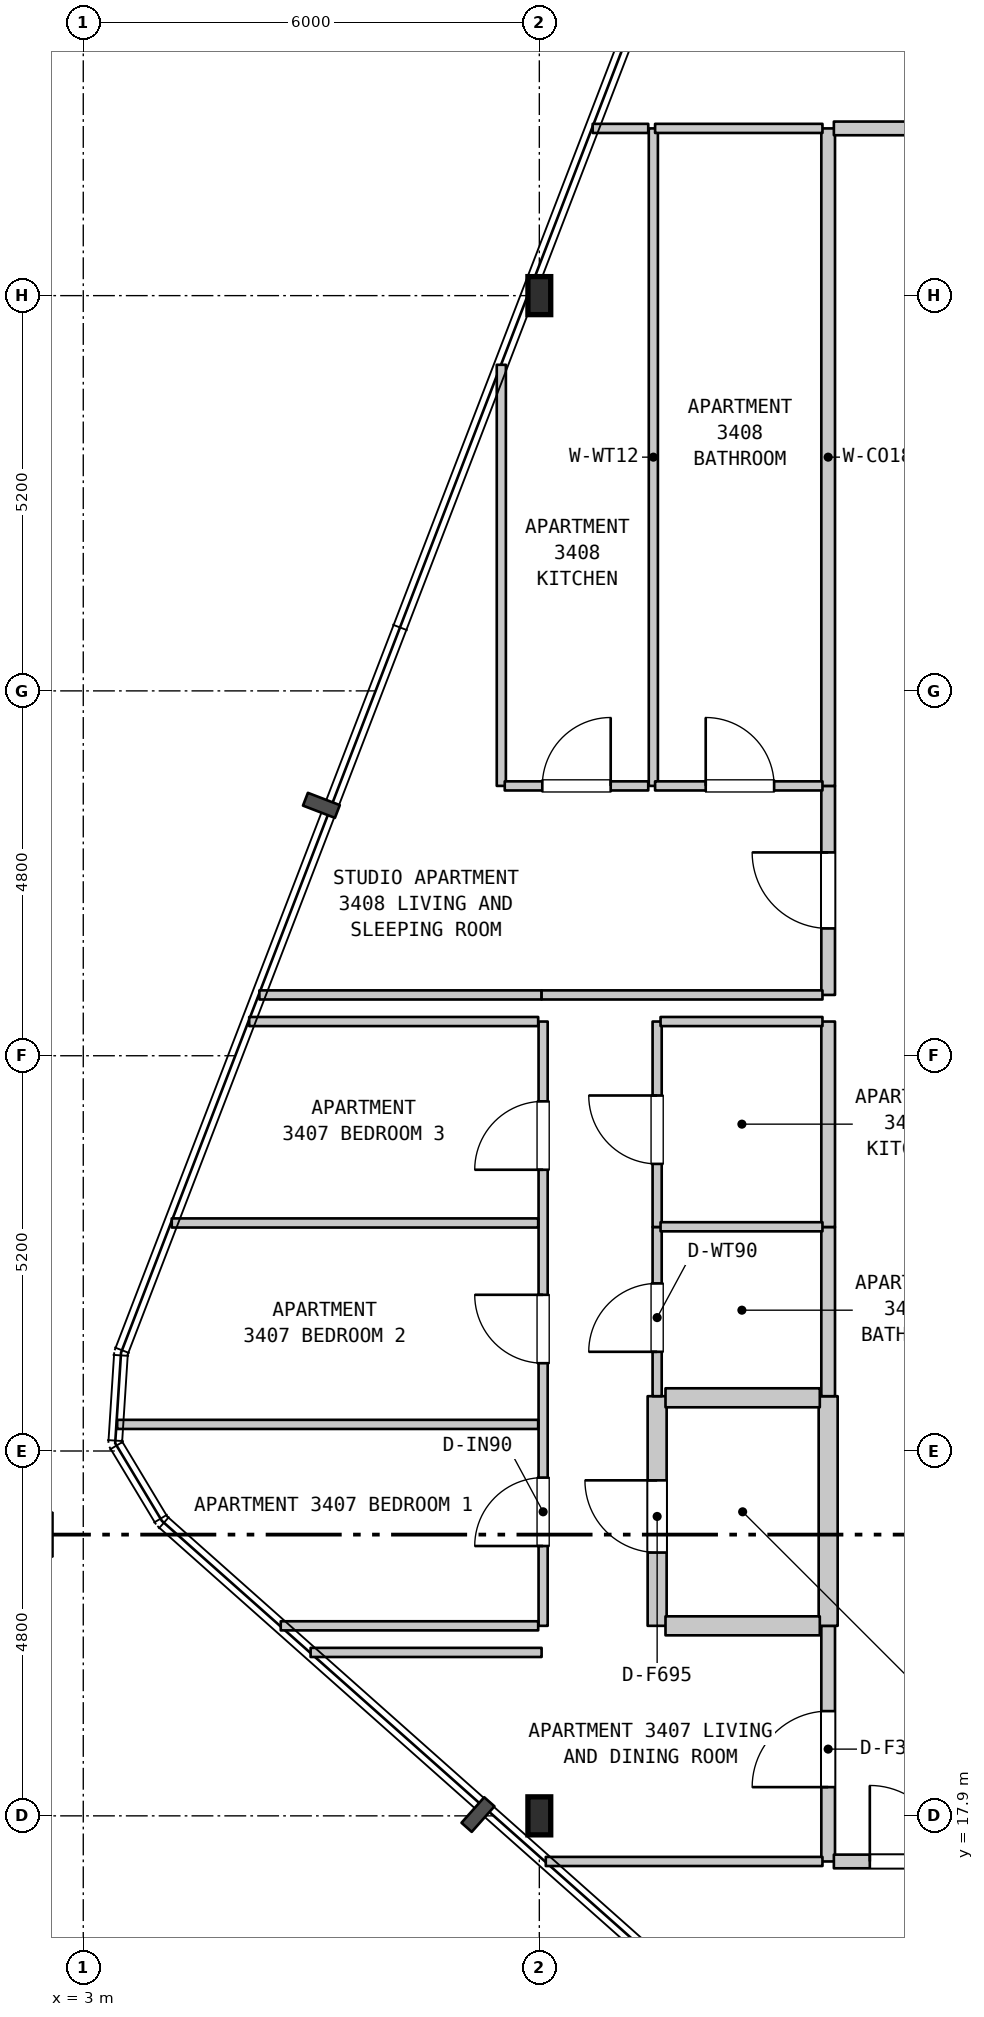
"""IFC4 building model, lengths in metres.
Left out: names, types, materials, properties, quantities, classifications, styles, units other than length and angle.
Written with IfcOpenShell. Run it as: python <this file> out.ifc"""

import sys

from ifc_helpers import new_model, si_unit, direction, frame, frame_2d, origin, origin_2d, place, context, subcontext, project, spatial, rectangle, i_section, extrude, element, fill, save


model = new_model("IFC4")
c1 = context("Model", 3, precision=1e-05, world=origin(), true_north=direction((0.0, 1.0)))
c2 = subcontext(c1, "Body", "Model", "MODEL_VIEW")
j1 = project(units=[si_unit("LENGTHUNIT", "METRE"), si_unit("PLANEANGLEUNIT", "RADIAN")], contexts=[c1])
p1 = place(None, origin())
s1 = spatial("IfcSite", under=j1, at=p1, CompositionType="ELEMENT")
p2 = place(p1, origin())
s2 = spatial("IfcBuilding", under=s1, at=p2, CompositionType="ELEMENT")
p3 = place(p2, frame((0.0, 0.0, 140.9)))
s3 = spatial("IfcBuildingStorey", under=s2, at=p3, CompositionType="ELEMENT", Elevation=140.9)
for number, where, z_axis, x_axis in (
    (1, (9.0, 17.9, 0.0), (0.0, 0.0, 1.0), (1.0, 0.0, 0.0)),
    (2, (9.0, 37.9, 0.0), (0.0, 0.0, 1.0), (1.0, 0.0, 0.0)),
):
    element("IfcColumn", number, at=place(p3, frame(where, z_axis=z_axis, x_axis=x_axis)), inside=s3, PredefinedType="COLUMN", context=c2, shape_type="SweptSolid", body=[
        extrude(i_section(OverallWidth=0.3, OverallDepth=0.5, WebThickness=0.014, FlangeThickness=0.028, FilletRadius=0.027, at=origin_2d()), origin(), (0.0, 0.0, 1.0), 3.7),
    ])
p4 = place(p3, frame((8.5, 31.45, 0.0), z_axis=(0.0, 0.0, 1.0), x_axis=(0.0, 1.0, 0.0)))
e3 = element("IfcWall", 3, at=p4, inside=s3, PredefinedType="PARTITIONING", context=c2, shape_type="SweptSolid", body=[
    extrude(rectangle(XDim=5.54, YDim=0.12, at=frame_2d((2.77, 0.0))), origin(), (0.0, 0.0, 1.0), 3.385),
])
p5 = place(p3, frame((9.05, 20.4, 0.0), z_axis=(0.0, 0.0, 1.0), x_axis=(0.0, 1.0, 0.0)))
e4 = element("IfcWall", 4, at=p5, inside=s3, PredefinedType="PARTITIONING", context=c2, shape_type="SweptSolid", body=[
    extrude(rectangle(XDim=7.95, YDim=0.12, at=frame_2d((3.975, 0.0))), origin(), (0.0, 0.0, 1.0), 2.785),
])
p6 = place(p5, frame((1.05, 0.0, 0.0)))
e5 = element("IfcOpeningElement", 5, at=p6, cuts=e4, PredefinedType="OPENING", context=c2, shape_type="SweptSolid", body=[
    extrude(rectangle(XDim=0.9, YDim=2.15, at=frame_2d((0.45, 1.075))), frame((0.0, 0.07, 0.0), z_axis=(0.0, -1.0, 0.0), x_axis=(1.0, 0.0, 0.0)), (0.0, 0.0, 1.0), 0.14),
])
p7 = place(p5, frame((3.455, 0.0, 0.0)))
e6 = element("IfcOpeningElement", 6, at=p7, cuts=e4, PredefinedType="OPENING", context=c2, shape_type="SweptSolid", body=[
    extrude(rectangle(XDim=0.9, YDim=2.15, at=frame_2d((0.45, 1.075))), frame((0.0, 0.07, 0.0), z_axis=(0.0, -1.0, 0.0), x_axis=(1.0, 0.0, 0.0)), (0.0, 0.0, 1.0), 0.14),
])
p8 = place(p5, frame((6.0, 0.0, 0.0)))
e7 = element("IfcOpeningElement", 7, at=p8, cuts=e4, PredefinedType="OPENING", context=c2, shape_type="SweptSolid", body=[
    extrude(rectangle(XDim=0.9, YDim=2.15, at=frame_2d((0.45, 1.075))), frame((0.0, 0.07, 0.0), z_axis=(0.0, -1.0, 0.0), x_axis=(1.0, 0.0, 0.0)), (0.0, 0.0, 1.0), 0.14),
])
p9 = place(p3, frame((10.5, 31.45, 0.0), z_axis=(0.0, 0.0, 1.0), x_axis=(0.0, 1.0, 0.0)))
e8 = element("IfcWall", 8, at=p9, inside=s3, PredefinedType="PARTITIONING", context=c2, shape_type="SweptSolid", body=[
    extrude(rectangle(XDim=8.65, YDim=0.12, at=frame_2d((4.325, 0.0))), origin(), (0.0, 0.0, 1.0), 3.385),
])
p10 = place(p3, frame((10.55, 20.4, 0.0), z_axis=(0.0, 0.0, 1.0), x_axis=(0.0, 1.0, 0.0)))
e9 = element("IfcWall", 9, at=p10, inside=s3, PredefinedType="STANDARD", context=c2, shape_type="SweptSolid", body=[
    extrude(rectangle(XDim=3.021, YDim=0.25, at=frame_2d((1.51, 0.0))), origin(), (0.0, 0.0, 1.0), 3.385),
])
p11 = place(p10, frame((0.964, 0.0, 0.0)))
e10 = element("IfcOpeningElement", 10, at=p11, cuts=e9, PredefinedType="OPENING", context=c2, shape_type="SweptSolid", body=[
    extrude(rectangle(XDim=0.95, YDim=2.15, at=frame_2d((0.475, 1.075))), frame((0.0, 0.135, 0.0), z_axis=(0.0, -1.0, 0.0), x_axis=(1.0, 0.0, 0.0)), (0.0, 0.0, 1.0), 0.27),
])
p12 = place(p3, frame((10.55, 23.421, 0.0), z_axis=(0.0, 0.0, 1.0), x_axis=(0.0, 1.0, 0.0)))
e11 = element("IfcWall", 11, at=p12, inside=s3, PredefinedType="PARTITIONING", context=c2, shape_type="SweptSolid", body=[
    extrude(rectangle(XDim=2.226, YDim=0.12, at=frame_2d((1.113, 0.0))), origin(), (0.0, 0.0, 1.0), 3.385),
])
p13 = place(p12, frame((0.584, 0.0, 0.0)))
e12 = element("IfcOpeningElement", 12, at=p13, cuts=e11, PredefinedType="OPENING", context=c2, shape_type="SweptSolid", body=[
    extrude(rectangle(XDim=0.9, YDim=2.1, at=frame_2d((0.45, 1.05))), frame((0.0, 0.07, 0.0), z_axis=(0.0, -1.0, 0.0), x_axis=(1.0, 0.0, 0.0)), (0.0, 0.0, 1.0), 0.14),
])
p14 = place(p3, frame((10.55, 25.647, 0.0), z_axis=(0.0, 0.0, 1.0), x_axis=(0.0, 1.0, 0.0)))
e13 = element("IfcWall", 13, at=p14, inside=s3, PredefinedType="PARTITIONING", context=c2, shape_type="SweptSolid", body=[
    extrude(rectangle(XDim=2.703, YDim=0.12, at=frame_2d((1.352, 0.0))), origin(), (0.0, 0.0, 1.0), 3.385),
])
p15 = place(p14, frame((0.83, 0.0, 0.0)))
e14 = element("IfcOpeningElement", 14, at=p15, cuts=e13, PredefinedType="OPENING", context=c2, shape_type="SweptSolid", body=[
    extrude(rectangle(XDim=0.9, YDim=2.15, at=frame_2d((0.45, 1.075))), frame((0.0, 0.07, 0.0), z_axis=(0.0, -1.0, 0.0), x_axis=(1.0, 0.0, 0.0)), (0.0, 0.0, 1.0), 0.14),
])
p16 = place(p3, frame((12.8, 17.3, 0.0), z_axis=(0.0, 0.0, 1.0), x_axis=(0.0, 1.0, 0.0)))
e15 = element("IfcWall", 15, at=p16, inside=s3, PredefinedType="STANDARD", context=c2, shape_type="SweptSolid", body=[
    extrude(rectangle(XDim=3.1, YDim=0.18, at=frame_2d((1.55, 0.0))), origin(), (0.0, 0.0, 1.0), 3.385),
])
p17 = place(p16, frame((0.978, 0.0, 0.0)))
e16 = element("IfcOpeningElement", 16, at=p17, cuts=e15, PredefinedType="OPENING", context=c2, shape_type="SweptSolid", body=[
    extrude(rectangle(XDim=1.0, YDim=2.15, at=frame_2d((0.5, 1.075))), frame((0.0, 0.1, 0.0), z_axis=(0.0, -1.0, 0.0), x_axis=(1.0, 0.0, 0.0)), (0.0, 0.0, 1.0), 0.2),
])
p18 = place(p3, frame((12.8, 20.4, 0.0), z_axis=(0.0, 0.0, 1.0), x_axis=(0.0, 1.0, 0.0)))
e17 = element("IfcWall", 17, at=p18, inside=s3, PredefinedType="STANDARD", context=c2, shape_type="SweptSolid", body=[
    extrude(rectangle(XDim=3.021, YDim=0.25, at=frame_2d((1.51, 0.0))), origin(), (0.0, 0.0, 1.0), 3.385),
])
p19 = place(p3, frame((12.8, 23.421, 0.0), z_axis=(0.0, 0.0, 1.0), x_axis=(0.0, 1.0, 0.0)))
e18 = element("IfcWall", 18, at=p19, inside=s3, PredefinedType="STANDARD", context=c2, shape_type="SweptSolid", body=[
    extrude(rectangle(XDim=2.226, YDim=0.18, at=frame_2d((1.113, 0.0))), origin(), (0.0, 0.0, 1.0), 3.385),
])
p20 = place(p3, frame((12.8, 25.647, 0.0), z_axis=(0.0, 0.0, 1.0), x_axis=(0.0, 1.0, 0.0)))
e19 = element("IfcWall", 19, at=p20, inside=s3, PredefinedType="STANDARD", context=c2, shape_type="SweptSolid", body=[
    extrude(rectangle(XDim=2.703, YDim=0.18, at=frame_2d((1.352, 0.0))), origin(), (0.0, 0.0, 1.0), 3.385),
])
p21 = place(p3, frame((12.8, 28.7, 0.0), z_axis=(0.0, 0.0, 1.0), x_axis=(0.0, 1.0, 0.0)))
e20 = element("IfcWall", 20, at=p21, inside=s3, PredefinedType="STANDARD", context=c2, shape_type="SweptSolid", body=[
    extrude(rectangle(XDim=2.75, YDim=0.18, at=frame_2d((1.375, 0.0))), origin(), (0.0, 0.0, 1.0), 3.385),
])
p22 = place(p21, frame((0.875, 0.0, 0.0)))
e21 = element("IfcOpeningElement", 21, at=p22, cuts=e20, PredefinedType="OPENING", context=c2, shape_type="SweptSolid", body=[
    extrude(rectangle(XDim=1.0, YDim=2.15, at=frame_2d((0.5, 1.075))), frame((0.0, 0.1, 0.0), z_axis=(0.0, -1.0, 0.0), x_axis=(1.0, 0.0, 0.0)), (0.0, 0.0, 1.0), 0.2),
])
p23 = place(p3, frame((12.8, 31.45, 0.0), z_axis=(0.0, 0.0, 1.0), x_axis=(0.0, 1.0, 0.0)))
e22 = element("IfcWall", 22, at=p23, inside=s3, PredefinedType="STANDARD", context=c2, shape_type="SweptSolid", body=[
    extrude(rectangle(XDim=8.65, YDim=0.18, at=frame_2d((4.325, 0.0))), origin(), (0.0, 0.0, 1.0), 3.385),
])
p24 = place(p3, frame((9.085, 17.3, 0.0), z_axis=(0.0, 0.0, 1.0), x_axis=(1.0, 0.0, 0.0)))
e23 = element("IfcWall", 23, at=p24, inside=s3, PredefinedType="PARTITIONING", context=c2, shape_type="SweptSolid", body=[
    extrude(rectangle(XDim=3.64, YDim=0.12, at=frame_2d((1.82, 0.0))), origin(), (0.0, 0.0, 1.0), 3.385),
])
p25 = place(p3, frame((12.875, 17.3, 0.0), z_axis=(0.0, 0.0, 1.0), x_axis=(1.0, 0.0, 0.0)))
e24 = element("IfcWall", 24, at=p25, inside=s3, PredefinedType="STANDARD", context=c2, shape_type="SweptSolid", body=[
    extrude(rectangle(XDim=3.58, YDim=0.18, at=frame_2d((1.79, 0.0))), origin(), (0.0, 0.0, 1.0), 3.385),
])
p26 = place(p25, frame((0.473, 0.0, 0.0)))
e25 = element("IfcOpeningElement", 25, at=p26, cuts=e24, PredefinedType="OPENING", context=c2, shape_type="SweptSolid", body=[
    extrude(rectangle(XDim=1.0, YDim=2.15, at=frame_2d((0.5, 1.075))), frame((0.0, 0.1, 0.0), z_axis=(0.0, -1.0, 0.0), x_axis=(1.0, 0.0, 0.0)), (0.0, 0.0, 1.0), 0.2),
])
p27 = place(p3, frame((5.991, 20.05, 0.0), z_axis=(0.0, 0.0, 1.0), x_axis=(1.0, 0.0, 0.0)))
e26 = element("IfcWall", 26, at=p27, inside=s3, PredefinedType="PARTITIONING", context=c2, shape_type="SweptSolid", body=[
    extrude(rectangle(XDim=3.039, YDim=0.12, at=frame_2d((1.52, 0.0))), origin(), (0.0, 0.0, 1.0), 3.385),
])
p28 = place(p3, frame((5.598, 20.4, 0.0), z_axis=(0.0, 0.0, 1.0), x_axis=(1.0, 0.0, 0.0)))
e27 = element("IfcWall", 27, at=p28, inside=s3, PredefinedType="PARTITIONING", context=c2, shape_type="SweptSolid", body=[
    extrude(rectangle(XDim=3.387, YDim=0.12, at=frame_2d((1.694, 0.0))), origin(), (0.0, 0.0, 1.0), 3.385),
])
p29 = place(p3, frame((10.66, 20.4, 0.0), z_axis=(0.0, 0.0, 1.0), x_axis=(1.0, 0.0, 0.0)))
e28 = element("IfcWall", 28, at=p29, inside=s3, PredefinedType="STANDARD", context=c2, shape_type="SweptSolid", body=[
    extrude(rectangle(XDim=2.03, YDim=0.25, at=frame_2d((1.015, 0.0))), origin(), (0.0, 0.0, 1.0), 3.385),
])
p30 = place(p3, frame((3.446, 23.05, 0.0), z_axis=(0.0, 0.0, 1.0), x_axis=(1.0, 0.0, 0.0)))
e29 = element("IfcWall", 29, at=p30, inside=s3, PredefinedType="PARTITIONING", context=c2, shape_type="SweptSolid", body=[
    extrude(rectangle(XDim=5.539, YDim=0.12, at=frame_2d((2.77, 0.0))), origin(), (0.0, 0.0, 1.0), 3.385),
])
p31 = place(p3, frame((10.66, 23.4, 0.0), z_axis=(0.0, 0.0, 1.0), x_axis=(1.0, 0.0, 0.0)))
e30 = element("IfcWall", 30, at=p31, inside=s3, PredefinedType="STANDARD", context=c2, shape_type="SweptSolid", body=[
    extrude(rectangle(XDim=2.03, YDim=0.25, at=frame_2d((1.015, 0.0))), origin(), (0.0, 0.0, 1.0), 3.385),
])
p32 = place(p3, frame((10.595, 25.65, 0.0), z_axis=(0.0, 0.0, 1.0), x_axis=(1.0, 0.0, 0.0)))
e31 = element("IfcWall", 31, at=p32, inside=s3, PredefinedType="PARTITIONING", context=c2, shape_type="SweptSolid", body=[
    extrude(rectangle(XDim=2.13, YDim=0.12, at=frame_2d((1.065, 0.0))), origin(), (0.0, 0.0, 1.0), 3.385),
])
p33 = place(p3, frame((4.164, 25.7, 0.0), z_axis=(0.0, 0.0, 1.0), x_axis=(1.0, 0.0, 0.0)))
e32 = element("IfcWall", 32, at=p33, inside=s3, PredefinedType="PARTITIONING", context=c2, shape_type="SweptSolid", body=[
    extrude(rectangle(XDim=4.821, YDim=0.12, at=frame_2d((2.411, 0.0))), origin(), (0.0, 0.0, 1.0), 3.385),
])
p34 = place(p3, frame((5.183, 28.35, 0.0), z_axis=(0.0, 0.0, 1.0), x_axis=(1.0, 0.0, 0.0)))
e33 = element("IfcWall", 33, at=p34, inside=s3, PredefinedType="PARTITIONING", context=c2, shape_type="SweptSolid", body=[
    extrude(rectangle(XDim=3.802, YDim=0.12, at=frame_2d((1.901, 0.0))), origin(), (0.0, 0.0, 1.0), 3.385),
])
p35 = place(p3, frame((10.595, 28.35, 0.0), z_axis=(0.0, 0.0, 1.0), x_axis=(1.0, 0.0, 0.0)))
e34 = element("IfcWall", 34, at=p35, inside=s3, PredefinedType="PARTITIONING", context=c2, shape_type="SweptSolid", body=[
    extrude(rectangle(XDim=2.13, YDim=0.12, at=frame_2d((1.065, 0.0))), origin(), (0.0, 0.0, 1.0), 3.385),
])
p36 = place(p3, frame((5.317, 28.7, 0.0), z_axis=(0.0, 0.0, 1.0), x_axis=(1.0, 0.0, 0.0)))
e35 = element("IfcWall", 35, at=p36, inside=s3, PredefinedType="PARTITIONING", context=c2, shape_type="SweptSolid", body=[
    extrude(rectangle(XDim=3.713, YDim=0.12, at=frame_2d((1.856, 0.0))), origin(), (0.0, 0.0, 1.0), 3.385),
])
p37 = place(p3, frame((9.03, 28.7, 0.0), z_axis=(0.0, 0.0, 1.0), x_axis=(1.0, 0.0, 0.0)))
e36 = element("IfcWall", 36, at=p37, inside=s3, PredefinedType="PARTITIONING", context=c2, shape_type="SweptSolid", body=[
    extrude(rectangle(XDim=3.695, YDim=0.12, at=frame_2d((1.848, 0.0))), origin(), (0.0, 0.0, 1.0), 3.385),
])
p38 = place(p3, frame((8.545, 31.45, 0.0), z_axis=(0.0, 0.0, 1.0), x_axis=(1.0, 0.0, 0.0)))
e37 = element("IfcWall", 37, at=p38, inside=s3, PredefinedType="PARTITIONING", context=c2, shape_type="SweptSolid", body=[
    extrude(rectangle(XDim=1.888, YDim=0.12, at=frame_2d((0.944, 0.0))), origin(), (0.0, 0.0, 1.0), 3.385),
])
p39 = place(p38, frame((0.494, 0.0, 0.0)))
e38 = element("IfcOpeningElement", 38, at=p39, cuts=e37, PredefinedType="OPENING", context=c2, shape_type="SweptSolid", body=[
    extrude(rectangle(XDim=0.9, YDim=2.15, at=frame_2d((0.45, 1.075))), frame((0.0, 0.07, 0.0), z_axis=(0.0, -1.0, 0.0), x_axis=(1.0, 0.0, 0.0)), (0.0, 0.0, 1.0), 0.14),
])
p40 = place(p3, frame((10.523, 31.45, 0.0), z_axis=(0.0, 0.0, 1.0), x_axis=(1.0, 0.0, 0.0)))
e39 = element("IfcWall", 39, at=p40, inside=s3, PredefinedType="PARTITIONING", context=c2, shape_type="SweptSolid", body=[
    extrude(rectangle(XDim=2.202, YDim=0.12, at=frame_2d((1.101, 0.0))), origin(), (0.0, 0.0, 1.0), 3.385),
])
p41 = place(p40, frame((0.666, 0.0, 0.0)))
e40 = element("IfcOpeningElement", 40, at=p41, cuts=e39, PredefinedType="OPENING", context=c2, shape_type="SweptSolid", body=[
    extrude(rectangle(XDim=0.9, YDim=2.1, at=frame_2d((0.45, 1.05))), frame((0.0, 0.07, 0.0), z_axis=(0.0, -1.0, 0.0), x_axis=(1.0, 0.0, 0.0)), (0.0, 0.0, 1.0), 0.14),
])
p42 = place(p3, frame((9.702, 40.1, 0.0), z_axis=(0.0, 0.0, 1.0), x_axis=(1.0, 0.0, 0.0)))
e41 = element("IfcWall", 41, at=p42, inside=s3, PredefinedType="PARTITIONING", context=c2, shape_type="SweptSolid", body=[
    extrude(rectangle(XDim=0.731, YDim=0.12, at=frame_2d((0.366, 0.0))), origin(), (0.0, 0.0, 1.0), 3.385),
])
p43 = place(p3, frame((10.523, 40.1, 0.0), z_axis=(0.0, 0.0, 1.0), x_axis=(1.0, 0.0, 0.0)))
e42 = element("IfcWall", 42, at=p43, inside=s3, PredefinedType="PARTITIONING", context=c2, shape_type="SweptSolid", body=[
    extrude(rectangle(XDim=2.202, YDim=0.12, at=frame_2d((1.101, 0.0))), origin(), (0.0, 0.0, 1.0), 3.385),
])
p44 = place(p3, frame((12.875, 40.1, 0.0), z_axis=(0.0, 0.0, 1.0), x_axis=(1.0, 0.0, 0.0)))
e43 = element("IfcWall", 43, at=p44, inside=s3, PredefinedType="STANDARD", context=c2, shape_type="SweptSolid", body=[
    extrude(rectangle(XDim=2.125, YDim=0.18, at=frame_2d((1.062, 0.0))), origin(), (0.0, 0.0, 1.0), 3.385),
])
p45 = place(p6, origin())
e44 = element("IfcDoor", 44, at=p45, inside=s3, OperationType="SINGLE_SWING_LEFT", PredefinedType="DOOR", context=c2, shape_type="SweptSolid", body=[
    extrude(rectangle(XDim=0.9, YDim=2.15, at=frame_2d((0.45, 1.075))), frame((0.0, 0.025, 0.0), z_axis=(0.0, -1.0, 0.0), x_axis=(1.0, 0.0, 0.0)), (0.0, 0.0, 1.0), 0.05),
])
fill(e5, e44)
p46 = place(p7, origin())
e45 = element("IfcDoor", 45, at=p46, inside=s3, OperationType="SINGLE_SWING_RIGHT", PredefinedType="DOOR", context=c2, shape_type="SweptSolid", body=[
    extrude(rectangle(XDim=0.9, YDim=2.15, at=frame_2d((0.45, 1.075))), frame((0.0, 0.025, 0.0), z_axis=(0.0, -1.0, 0.0), x_axis=(1.0, 0.0, 0.0)), (0.0, 0.0, 1.0), 0.05),
])
fill(e6, e45)
p47 = place(p8, origin())
e46 = element("IfcDoor", 46, at=p47, inside=s3, OperationType="SINGLE_SWING_LEFT", PredefinedType="DOOR", context=c2, shape_type="SweptSolid", body=[
    extrude(rectangle(XDim=0.9, YDim=2.15, at=frame_2d((0.45, 1.075))), frame((0.0, 0.025, 0.0), z_axis=(0.0, -1.0, 0.0), x_axis=(1.0, 0.0, 0.0)), (0.0, 0.0, 1.0), 0.05),
])
fill(e7, e46)
p48 = place(p11, origin())
e47 = element("IfcDoor", 47, at=p48, inside=s3, OperationType="SINGLE_SWING_RIGHT", PredefinedType="DOOR", context=c2, shape_type="SweptSolid", body=[
    extrude(rectangle(XDim=0.95, YDim=2.15, at=frame_2d((0.475, 1.075))), frame((0.0, 0.025, 0.0), z_axis=(0.0, -1.0, 0.0), x_axis=(1.0, 0.0, 0.0)), (0.0, 0.0, 1.0), 0.05),
])
fill(e10, e47)
p49 = place(p13, origin())
e48 = element("IfcDoor", 48, at=p49, inside=s3, OperationType="SINGLE_SWING_LEFT", PredefinedType="DOOR", context=c2, shape_type="SweptSolid", body=[
    extrude(rectangle(XDim=0.9, YDim=2.1, at=frame_2d((0.45, 1.05))), frame((0.0, 0.025, 0.0), z_axis=(0.0, -1.0, 0.0), x_axis=(1.0, 0.0, 0.0)), (0.0, 0.0, 1.0), 0.05),
])
fill(e12, e48)
p50 = place(p15, origin())
e49 = element("IfcDoor", 49, at=p50, inside=s3, OperationType="SINGLE_SWING_RIGHT", PredefinedType="DOOR", context=c2, shape_type="SweptSolid", body=[
    extrude(rectangle(XDim=0.9, YDim=2.15, at=frame_2d((0.45, 1.075))), frame((0.0, 0.025, 0.0), z_axis=(0.0, -1.0, 0.0), x_axis=(1.0, 0.0, 0.0)), (0.0, 0.0, 1.0), 0.05),
])
fill(e14, e49)
p51 = place(p17, origin())
e50 = element("IfcDoor", 50, at=p51, inside=s3, OperationType="SINGLE_SWING_LEFT", PredefinedType="DOOR", context=c2, shape_type="SweptSolid", body=[
    extrude(rectangle(XDim=1.0, YDim=2.15, at=frame_2d((0.5, 1.075))), frame((0.0, 0.025, 0.0), z_axis=(0.0, -1.0, 0.0), x_axis=(1.0, 0.0, 0.0)), (0.0, 0.0, 1.0), 0.05),
])
fill(e16, e50)
p52 = place(p22, origin())
e51 = element("IfcDoor", 51, at=p52, inside=s3, OperationType="SINGLE_SWING_RIGHT", PredefinedType="DOOR", context=c2, shape_type="SweptSolid", body=[
    extrude(rectangle(XDim=1.0, YDim=2.15, at=frame_2d((0.5, 1.075))), frame((0.0, 0.025, 0.0), z_axis=(0.0, -1.0, 0.0), x_axis=(1.0, 0.0, 0.0)), (0.0, 0.0, 1.0), 0.05),
])
fill(e21, e51)
p53 = place(p26, origin())
e52 = element("IfcDoor", 52, at=p53, inside=s3, OperationType="SINGLE_SWING_LEFT", PredefinedType="DOOR", context=c2, shape_type="SweptSolid", body=[
    extrude(rectangle(XDim=1.0, YDim=2.15, at=frame_2d((0.5, 1.075))), frame((0.0, 0.025, 0.0), z_axis=(0.0, -1.0, 0.0), x_axis=(1.0, 0.0, 0.0)), (0.0, 0.0, 1.0), 0.05),
])
fill(e25, e52)
p54 = place(p39, origin())
e53 = element("IfcDoor", 53, at=p54, inside=s3, OperationType="SINGLE_SWING_RIGHT", PredefinedType="DOOR", context=c2, shape_type="SweptSolid", body=[
    extrude(rectangle(XDim=0.9, YDim=2.15, at=frame_2d((0.45, 1.075))), frame((0.0, 0.025, 0.0), z_axis=(0.0, -1.0, 0.0), x_axis=(1.0, 0.0, 0.0)), (0.0, 0.0, 1.0), 0.05),
])
fill(e38, e53)
p55 = place(p41, origin())
e54 = element("IfcDoor", 54, at=p55, inside=s3, OperationType="SINGLE_SWING_LEFT", PredefinedType="DOOR", context=c2, shape_type="SweptSolid", body=[
    extrude(rectangle(XDim=0.9, YDim=2.1, at=frame_2d((0.45, 1.05))), frame((0.0, 0.025, 0.0), z_axis=(0.0, -1.0, 0.0), x_axis=(1.0, 0.0, 0.0)), (0.0, 0.0, 1.0), 0.05),
])
fill(e40, e54)
save(model, sys.argv[1])
